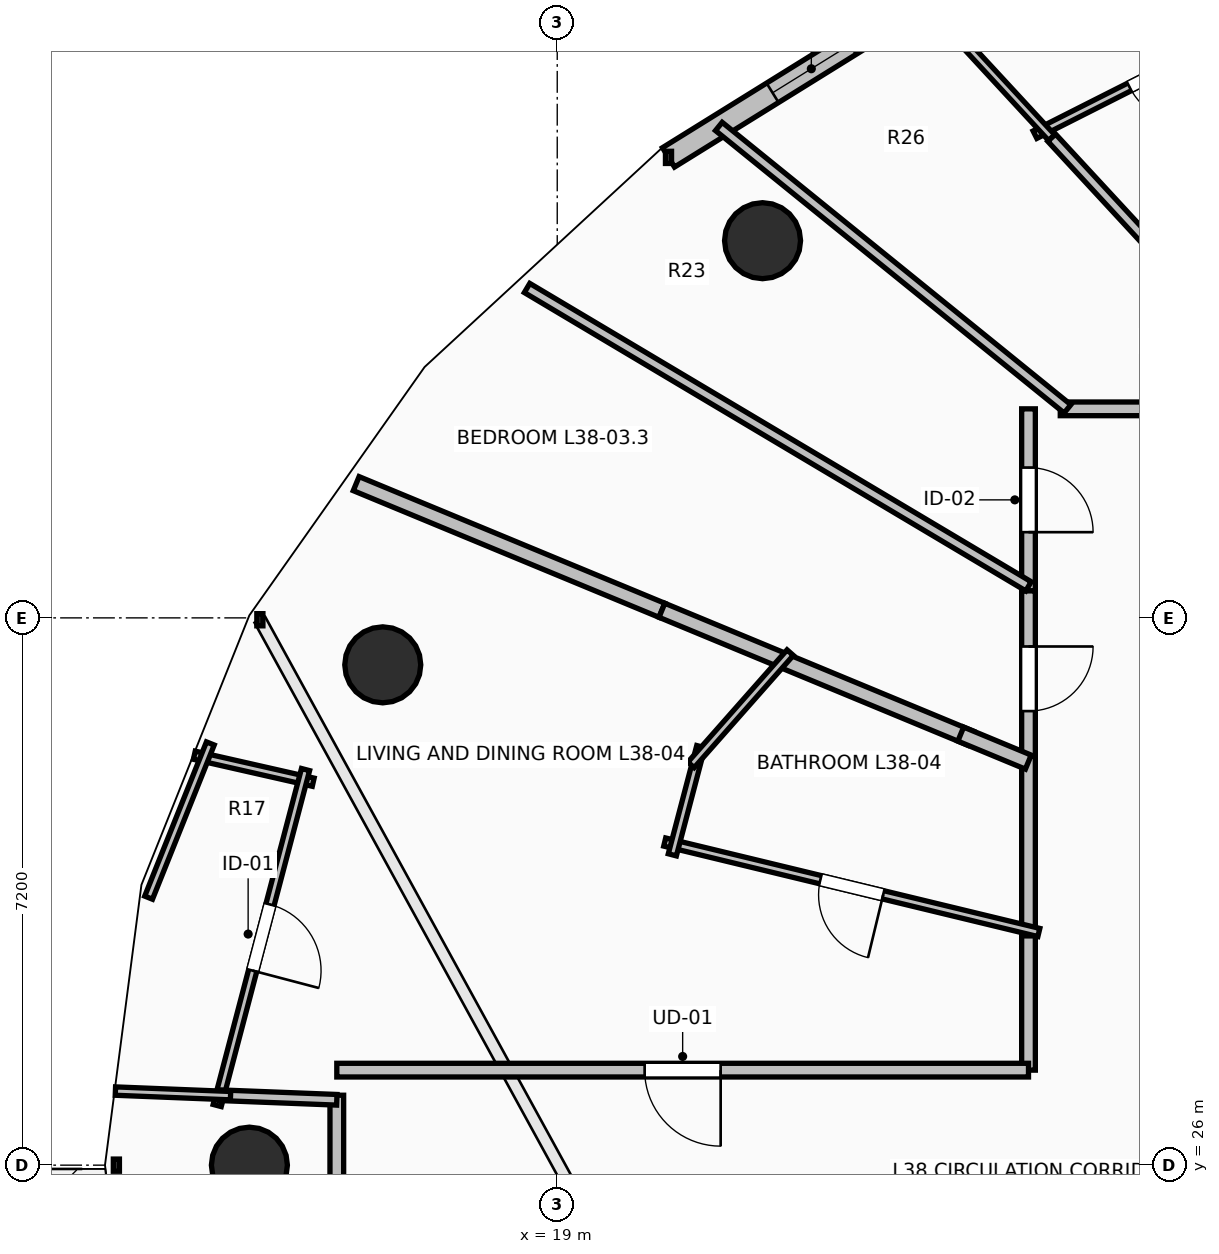
"""IFC4 building model, lengths in metres.
Left out: names, types, materials, properties, quantities, classifications, styles, units other than length and angle.
Written with IfcOpenShell. Run it as: python <this file> out.ifc"""

import sys

from ifc_helpers import new_model, si_unit, direction, frame, frame_2d, origin, origin_2d, place, context, subcontext, project, spatial, rectangle, circle, extrude, element, fill, save


model = new_model("IFC4")
c1 = context("Model", 3, precision=1e-05, world=origin(), true_north=direction((0.0, 1.0)))
c2 = subcontext(c1, "Body", "Model", "MODEL_VIEW")
j1 = project(units=[si_unit("LENGTHUNIT", "METRE"), si_unit("PLANEANGLEUNIT", "RADIAN")], contexts=[c1])
p1 = place(None, origin())
s1 = spatial("IfcSite", under=j1, at=p1, CompositionType="ELEMENT")
p2 = place(p1, origin())
s2 = spatial("IfcBuilding", under=s1, at=p2, CompositionType="ELEMENT")
p3 = place(p2, frame((0.0, 0.0, 143.1)))
s3 = spatial("IfcBuildingStorey", under=s2, at=p3, CompositionType="ELEMENT", Elevation=143.1)
for number, where, z_axis, x_axis in (
    (1, (21.701, 38.162, 0.0), (0.0, 0.0, 1.0), (-0.707, 0.707, 0.0)),
    (2, (16.705, 32.582, 0.0), (0.0, 0.0, 1.0), (-0.924, 0.383, 0.0)),
    (3, (14.95, 26.0, 0.0), (0.0, 0.0, 1.0), (-1.0, 0.0, 0.0)),
):
    element("IfcColumn", number, at=place(p3, frame(where, z_axis=z_axis, x_axis=x_axis)), inside=s3, PredefinedType="COLUMN", context=c2, shape_type="SweptSolid", body=[
        extrude(circle(Radius=0.5, at=origin_2d()), origin(), (0.0, 0.0, 1.0), 3.5),
    ])
p4 = place(p3, frame((24.222, 41.59, 0.0), z_axis=(0.0, 0.0, 1.0), x_axis=(-0.849721181976, -0.527232313977, 0.0)))
e4 = element("IfcWall", 4, at=p4, inside=s3, PredefinedType="STANDARD", context=c2, shape_type="SweptSolid", body=[
    extrude(rectangle(XDim=4.423, YDim=0.3, at=frame_2d((2.211, 0.0))), origin(), (0.0, 0.0, 1.0), 3.24),
])
p5 = place(p4, frame((1.611, 0.0, 0.85)))
e5 = element("IfcOpeningElement", 5, at=p5, cuts=e4, PredefinedType="OPENING", context=c2, shape_type="SweptSolid", body=[
    extrude(rectangle(XDim=1.2, YDim=1.95, at=frame_2d((0.6, 0.975))), frame((0.0, 0.165, 0.0), z_axis=(0.0, -1.0, 0.0), x_axis=(1.0, 0.0, 0.0)), (0.0, 0.0, 1.0), 0.33),
])
p6 = place(p3, frame((28.72, 35.95, 0.0), z_axis=(0.0, 0.0, 1.0), x_axis=(-1.0, 0.0, 0.0)))
e6 = element("IfcWall", 6, at=p6, inside=s3, PredefinedType="PARTITIONING", context=c2, shape_type="SweptSolid", body=[
    extrude(rectangle(XDim=3.102, YDim=0.18, at=frame_2d((1.551, 0.0))), origin(), (0.0, 0.0, 1.0), 2.432),
])
p7 = place(p3, frame((25.2, 35.95, 0.0), z_axis=(0.0, 0.0, 1.0), x_axis=(0.0, -1.0, 0.0)))
e7 = element("IfcWall", 7, at=p7, inside=s3, PredefinedType="PARTITIONING", context=c2, shape_type="SweptSolid", body=[
    extrude(rectangle(XDim=2.395, YDim=0.18, at=frame_2d((1.198, 0.0))), origin(), (0.0, 0.0, 1.0), 2.432),
])
p8 = place(p7, frame((0.772, 0.0, 0.0)))
e8 = element("IfcOpeningElement", 8, at=p8, cuts=e7, PredefinedType="OPENING", context=c2, shape_type="SweptSolid", body=[
    extrude(rectangle(XDim=0.85, YDim=2.1, at=frame_2d((0.425, 1.05))), frame((0.0, 0.105, 0.0), z_axis=(0.0, -1.0, 0.0), x_axis=(1.0, 0.0, 0.0)), (0.0, 0.0, 1.0), 0.21),
])
p9 = place(p3, frame((25.2, 33.555, 0.0), z_axis=(0.0, 0.0, 1.0), x_axis=(0.0, -1.0, 0.0)))
e9 = element("IfcWall", 9, at=p9, inside=s3, PredefinedType="PARTITIONING", context=c2, shape_type="SweptSolid", body=[
    extrude(rectangle(XDim=2.313, YDim=0.18, at=frame_2d((1.156, 0.0))), origin(), (0.0, 0.0, 1.0), 3.24),
])
p10 = place(p9, frame((0.731, 0.0, 0.0)))
e10 = element("IfcOpeningElement", 10, at=p10, cuts=e9, PredefinedType="OPENING", context=c2, shape_type="SweptSolid", body=[
    extrude(rectangle(XDim=0.85, YDim=2.1, at=frame_2d((0.425, 1.05))), frame((0.0, 0.105, 0.0), z_axis=(0.0, -1.0, 0.0), x_axis=(1.0, 0.0, 0.0)), (0.0, 0.0, 1.0), 0.21),
])
p11 = place(p3, frame((25.2, 29.156, 0.0), z_axis=(0.0, 0.0, 1.0), x_axis=(0.0, -1.0, 0.0)))
e11 = element("IfcWall", 11, at=p11, inside=s3, PredefinedType="PARTITIONING", context=c2, shape_type="SweptSolid", body=[
    extrude(rectangle(XDim=1.906, YDim=0.18, at=frame_2d((0.953, 0.0))), origin(), (0.0, 0.0, 1.0), 2.432),
])
p12 = place(p3, frame((25.2, 27.25, 0.0), z_axis=(0.0, 0.0, 1.0), x_axis=(-1.0, 0.0, 0.0)))
e12 = element("IfcWall", 12, at=p12, inside=s3, PredefinedType="PARTITIONING", context=c2, shape_type="SweptSolid", body=[
    extrude(rectangle(XDim=9.1, YDim=0.18, at=frame_2d((4.55, 0.0))), origin(), (0.0, 0.0, 1.0), 2.432),
])
p13 = place(p12, frame((4.05, 0.0, 0.0)))
e13 = element("IfcOpeningElement", 13, at=p13, cuts=e12, PredefinedType="OPENING", context=c2, shape_type="SweptSolid", body=[
    extrude(rectangle(XDim=1.0, YDim=2.15, at=frame_2d((0.5, 1.075))), frame((0.0, 0.105, 0.0), z_axis=(0.0, -1.0, 0.0), x_axis=(1.0, 0.0, 0.0)), (0.0, 0.0, 1.0), 0.21),
])
p14 = place(p3, frame((25.2, 31.382, 0.0), z_axis=(0.0, 0.0, 1.0), x_axis=(0.0, -1.0, 0.0)))
e14 = element("IfcWall", 14, at=p14, inside=s3, PredefinedType="PARTITIONING", context=c2, shape_type="SweptSolid", body=[
    extrude(rectangle(XDim=2.366, YDim=0.18, at=frame_2d((1.183, 0.0))), origin(), (0.0, 0.0, 1.0), 2.432),
])
p15 = place(p3, frame((16.1, 26.92, 0.0), z_axis=(0.0, 0.0, 1.0), x_axis=(0.0, -1.0, 0.0)))
e15 = element("IfcWall", 15, at=p15, inside=s3, PredefinedType="PARTITIONING", context=c2, shape_type="SweptSolid", body=[
    extrude(rectangle(XDim=2.37, YDim=0.18, at=frame_2d((1.185, 0.0))), origin(), (0.0, 0.0, 1.0), 2.432),
])
p16 = place(p3, frame((28.574, 41.219, 0.0), z_axis=(0.0, 0.0, 1.0), x_axis=(-0.892470920122, -0.451104928744, 0.0)))
e16 = element("IfcWall", 16, at=p16, inside=s3, PredefinedType="PARTITIONING", context=c2, shape_type="SweptSolid", body=[
    extrude(rectangle(XDim=3.685, YDim=0.11, at=frame_2d((1.843, 0.0))), origin(), (0.0, 0.0, 1.0), 3.24),
])
p17 = place(p16, frame((1.393, 0.0, 0.0)))
e17 = element("IfcOpeningElement", 17, at=p17, cuts=e16, PredefinedType="OPENING", context=c2, shape_type="SweptSolid", body=[
    extrude(rectangle(XDim=0.9, YDim=2.1, at=frame_2d((0.45, 1.05))), frame((0.0, 0.07, 0.0), z_axis=(0.0, -1.0, 0.0), x_axis=(1.0, 0.0, 0.0)), (0.0, 0.0, 1.0), 0.14),
])
p18 = place(p3, frame((25.505, 39.517, 0.0), z_axis=(0.0, 0.0, 1.0), x_axis=(-0.678720806978, 0.734396395808, 0.0)))
e18 = element("IfcWall", 18, at=p18, inside=s3, PredefinedType="PARTITIONING", context=c2, shape_type="SweptSolid", body=[
    extrude(rectangle(XDim=2.622, YDim=0.11, at=frame_2d((1.311, 0.0))), origin(), (0.0, 0.0, 1.0), 2.728),
])
p19 = place(p3, frame((25.505, 39.517, 0.0), z_axis=(0.0, 0.0, 1.0), x_axis=(0.678766339668, -0.734354312395, 0.0)))
e19 = element("IfcWall", 19, at=p19, inside=s3, PredefinedType="PARTITIONING", context=c2, shape_type="SweptSolid", body=[
    extrude(rectangle(XDim=4.857, YDim=0.14, at=frame_2d((2.429, 0.0))), origin(), (0.0, 0.0, 1.0), 2.432),
])
p20 = place(p19, frame((1.979, 0.0, 0.0)))
e20 = element("IfcOpeningElement", 20, at=p20, cuts=e19, PredefinedType="OPENING", context=c2, shape_type="SweptSolid", body=[
    extrude(rectangle(XDim=0.9, YDim=2.1, at=frame_2d((0.45, 1.05))), frame((0.0, 0.085, 0.0), z_axis=(0.0, -1.0, 0.0), x_axis=(1.0, 0.0, 0.0)), (0.0, 0.0, 1.0), 0.17),
])
p21 = place(p3, frame((21.126, 39.665, 0.0), z_axis=(0.0, 0.0, 1.0), x_axis=(0.777089771819, -0.629389773141, 0.0)))
e21 = element("IfcWall", 21, at=p21, inside=s3, PredefinedType="PARTITIONING", context=c2, shape_type="SweptSolid", body=[
    extrude(rectangle(XDim=5.903, YDim=0.14, at=frame_2d((2.951, 0.0))), origin(), (0.0, 0.0, 1.0), 2.728),
])
p22 = place(p3, frame((18.603, 37.54, 0.0), z_axis=(0.0, 0.0, 1.0), x_axis=(0.859389720334, -0.511321140365, 0.0)))
e22 = element("IfcWall", 22, at=p22, inside=s3, PredefinedType="PARTITIONING", context=c2, shape_type="SweptSolid", body=[
    extrude(rectangle(XDim=7.676, YDim=0.14, at=frame_2d((3.838, 0.0))), origin(), (0.0, 0.0, 1.0), 2.728),
])
p23 = place(p3, frame((16.355, 34.966, 0.0), z_axis=(0.0, 0.0, 1.0), x_axis=(0.923874659351, -0.382695197002, 0.0)))
e23 = element("IfcWall", 23, at=p23, inside=s3, PredefinedType="PARTITIONING", context=c2, shape_type="SweptSolid", body=[
    extrude(rectangle(XDim=4.353, YDim=0.2, at=frame_2d((2.177, 0.0))), origin(), (0.0, 0.0, 1.0), 2.728),
])
p24 = place(p3, frame((20.377, 33.3, 0.0), z_axis=(0.0, 0.0, 1.0), x_axis=(0.923801529802, -0.382871693306, 0.0)))
e24 = element("IfcWall", 24, at=p24, inside=s3, PredefinedType="PARTITIONING", context=c2, shape_type="SweptSolid", body=[
    extrude(rectangle(XDim=4.396, YDim=0.2, at=frame_2d((2.198, 0.0))), origin(), (0.0, 0.0, 1.0), 2.922),
])
p25 = place(p3, frame((24.309, 31.671, 0.0), z_axis=(0.0, 0.0, 1.0), x_axis=(0.923855963606, -0.38274032778, 0.0)))
e25 = element("IfcWall", 25, at=p25, inside=s3, PredefinedType="PARTITIONING", context=c2, shape_type="SweptSolid", body=[
    extrude(rectangle(XDim=0.962, YDim=0.2, at=frame_2d((0.481, 0.0))), origin(), (0.0, 0.0, 1.0), 2.972),
])
p26 = place(p3, frame((25.336, 29.061, 0.0), z_axis=(0.0, 0.0, 1.0), x_axis=(-0.972001766098, 0.234973544686, 0.0)))
e26 = element("IfcWall", 26, at=p26, inside=s3, PredefinedType="PARTITIONING", context=c2, shape_type="SweptSolid", body=[
    extrude(rectangle(XDim=5.064, YDim=0.11, at=frame_2d((2.532, 0.0))), origin(), (0.0, 0.0, 1.0), 2.432),
])
p27 = place(p26, frame((2.107, 0.0, 0.0)))
e27 = element("IfcOpeningElement", 27, at=p27, cuts=e26, PredefinedType="OPENING", context=c2, shape_type="SweptSolid", body=[
    extrude(rectangle(XDim=0.85, YDim=2.1, at=frame_2d((0.425, 1.05))), frame((0.0, 0.07, 0.0), z_axis=(0.0, -1.0, 0.0), x_axis=(1.0, 0.0, 0.0)), (0.0, 0.0, 1.0), 0.14),
])
p28 = place(p3, frame((20.514, 30.083, 0.0), z_axis=(0.0, 0.0, 1.0), x_axis=(0.254223916145, 0.967145387447, 0.0)))
e28 = element("IfcWall", 28, at=p28, inside=s3, PredefinedType="PARTITIONING", context=c2, shape_type="SweptSolid", body=[
    extrude(rectangle(XDim=1.472, YDim=0.11, at=frame_2d((0.736, 0.0))), origin(), (0.0, 0.0, 1.0), 2.432),
])
p29 = place(p3, frame((20.76, 31.266, 0.0), z_axis=(0.0, 0.0, 1.0), x_axis=(0.662014950831, 0.749490630279, 0.0)))
e29 = element("IfcWall", 29, at=p29, inside=s3, PredefinedType="PARTITIONING", context=c2, shape_type="SweptSolid", body=[
    extrude(rectangle(XDim=1.97, YDim=0.11, at=frame_2d((0.985, 0.0))), origin(), (0.0, 0.0, 1.0), 2.922),
])
p30 = place(p3, frame((14.226, 31.393, 0.0), z_axis=(0.0, 0.0, 1.0), x_axis=(0.975195623383, -0.221344744989, 0.0)))
e30 = element("IfcWall", 30, at=p30, inside=s3, PredefinedType="PARTITIONING", context=c2, shape_type="SweptSolid", body=[
    extrude(rectangle(XDim=1.604, YDim=0.11, at=frame_2d((0.802, 0.0))), origin(), (0.0, 0.0, 1.0), 3.24),
])
p31 = place(p3, frame((15.689, 31.204, 0.0), z_axis=(0.0, 0.0, 1.0), x_axis=(-0.254346037576, -0.967113278354, 0.0)))
e31 = element("IfcWall", 31, at=p31, inside=s3, PredefinedType="PARTITIONING", context=c2, shape_type="SweptSolid", body=[
    extrude(rectangle(XDim=4.57, YDim=0.11, at=frame_2d((2.285, 0.0))), origin(), (0.0, 0.0, 1.0), 3.24),
])
p32 = place(p31, frame((1.835, 0.0, 0.0)))
e32 = element("IfcOpeningElement", 32, at=p32, cuts=e31, PredefinedType="OPENING", context=c2, shape_type="SweptSolid", body=[
    extrude(rectangle(XDim=0.9, YDim=2.1, at=frame_2d((0.45, 1.05))), frame((0.0, 0.07, 0.0), z_axis=(0.0, -1.0, 0.0), x_axis=(1.0, 0.0, 0.0)), (0.0, 0.0, 1.0), 0.14),
])
p33 = place(p3, frame((14.436, 31.548, 0.0), z_axis=(0.0, 0.0, 1.0), x_axis=(-0.371544752876, -0.928415045446, 0.0)))
e33 = element("IfcWall", 33, at=p33, inside=s3, PredefinedType="PARTITIONING", context=c2, shape_type="SweptSolid", body=[
    extrude(rectangle(XDim=2.186, YDim=0.11, at=frame_2d((1.093, 0.0))), origin(), (0.0, 0.0, 1.0), 3.24),
])
p34 = place(p3, frame((14.562, 26.92, 0.0), z_axis=(0.0, 0.0, 1.0), x_axis=(0.999244683777, -0.03885951548, 0.0)))
e34 = element("IfcWall", 34, at=p34, inside=s3, PredefinedType="PARTITIONING", context=c2, shape_type="SweptSolid", body=[
    extrude(rectangle(XDim=1.539, YDim=0.14, at=frame_2d((0.77, 0.0))), origin(), (0.0, 0.0, 1.0), 2.728),
])
p35 = place(p3, frame((13.187, 26.975, 0.0), z_axis=(0.0, 0.0, 1.0), x_axis=(0.999208657324, -0.039775106907, 0.0)))
e35 = element("IfcWall", 35, at=p35, inside=s3, PredefinedType="PARTITIONING", context=c2, shape_type="SweptSolid", body=[
    extrude(rectangle(XDim=1.516, YDim=0.11, at=frame_2d((0.758, 0.0))), origin(), (0.0, 0.0, 1.0), 3.24),
])
p36 = place(p5, origin())
e36 = element("IfcWindow", 36, at=p36, inside=s3, PartitioningType="SINGLE_PANEL", PredefinedType="WINDOW", context=c2, shape_type="SweptSolid", body=[
    extrude(rectangle(XDim=1.2, YDim=1.95, at=frame_2d((0.6, 0.975))), frame((0.0, 0.03, 0.0), z_axis=(0.0, -1.0, 0.0), x_axis=(1.0, 0.0, 0.0)), (0.0, 0.0, 1.0), 0.06),
])
fill(e5, e36)
p37 = place(p13, origin())
e37 = element("IfcDoor", 37, at=p37, inside=s3, OperationType="SINGLE_SWING_LEFT", PredefinedType="DOOR", context=c2, shape_type="SweptSolid", body=[
    extrude(rectangle(XDim=1.0, YDim=2.15, at=frame_2d((0.5, 1.075))), frame((0.0, 0.025, 0.0), z_axis=(0.0, -1.0, 0.0), x_axis=(1.0, 0.0, 0.0)), (0.0, 0.0, 1.0), 0.05),
])
fill(e13, e37)
p38 = place(p17, origin())
e38 = element("IfcDoor", 38, at=p38, inside=s3, OperationType="SINGLE_SWING_LEFT", PredefinedType="DOOR", context=c2, shape_type="SweptSolid", body=[
    extrude(rectangle(XDim=0.9, YDim=2.1, at=frame_2d((0.45, 1.05))), frame((0.0, 0.025, 0.0), z_axis=(0.0, -1.0, 0.0), x_axis=(1.0, 0.0, 0.0)), (0.0, 0.0, 1.0), 0.05),
])
fill(e17, e38)
p39 = place(p27, origin())
e39 = element("IfcDoor", 39, at=p39, inside=s3, OperationType="SINGLE_SWING_LEFT", PredefinedType="DOOR", context=c2, shape_type="SweptSolid", body=[
    extrude(rectangle(XDim=0.85, YDim=2.1, at=frame_2d((0.425, 1.05))), frame((0.0, 0.025, 0.0), z_axis=(0.0, -1.0, 0.0), x_axis=(1.0, 0.0, 0.0)), (0.0, 0.0, 1.0), 0.05),
])
fill(e27, e39)
p40 = place(p32, origin())
e40 = element("IfcDoor", 40, at=p40, inside=s3, OperationType="SINGLE_SWING_RIGHT", PredefinedType="DOOR", context=c2, shape_type="SweptSolid", body=[
    extrude(rectangle(XDim=0.9, YDim=2.1, at=frame_2d((0.45, 1.05))), frame((0.0, 0.025, 0.0), z_axis=(0.0, -1.0, 0.0), x_axis=(1.0, 0.0, 0.0)), (0.0, 0.0, 1.0), 0.05),
])
fill(e32, e40)
p41 = place(p8, origin())
e41 = element("IfcDoor", 41, at=p41, inside=s3, OperationType="SINGLE_SWING_RIGHT", PredefinedType="DOOR", context=c2, shape_type="SweptSolid", body=[
    extrude(rectangle(XDim=0.85, YDim=2.1, at=frame_2d((0.425, 1.05))), frame((0.0, 0.025, 0.0), z_axis=(0.0, -1.0, 0.0), x_axis=(1.0, 0.0, 0.0)), (0.0, 0.0, 1.0), 0.05),
])
fill(e8, e41)
p42 = place(p10, origin())
e42 = element("IfcDoor", 42, at=p42, inside=s3, OperationType="SINGLE_SWING_LEFT", PredefinedType="DOOR", context=c2, shape_type="SweptSolid", body=[
    extrude(rectangle(XDim=0.85, YDim=2.1, at=frame_2d((0.425, 1.05))), frame((0.0, 0.025, 0.0), z_axis=(0.0, -1.0, 0.0), x_axis=(1.0, 0.0, 0.0)), (0.0, 0.0, 1.0), 0.05),
])
fill(e10, e42)
save(model, sys.argv[1])
